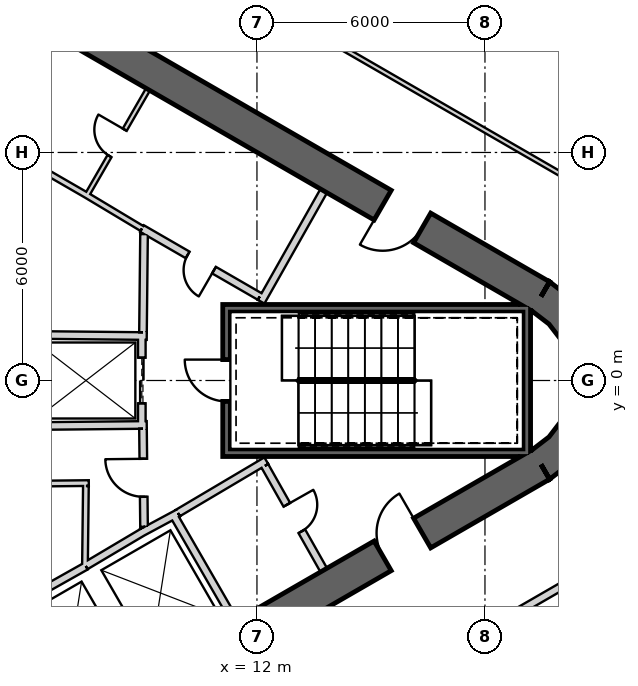
"""IFC4 building model, lengths in metres.
Left out: names, types, materials, properties, quantities, classifications, styles, units other than length and angle.
Written with IfcOpenShell. Run it as: python <this file> out.ifc"""

import sys

from ifc_helpers import new_model, si_unit, direction, frame, frame_2d, origin, place, context, subcontext, project, spatial, polyline, rectangle, outline, extrude, element, fill, save


model = new_model("IFC4")
c1 = context("Model", 3, precision=1e-05, world=origin(), true_north=direction((0.0, 1.0)))
c2 = subcontext(c1, "Body", "Model", "MODEL_VIEW")
j1 = project(units=[si_unit("LENGTHUNIT", "METRE"), si_unit("PLANEANGLEUNIT", "RADIAN")], contexts=[c1])
p1 = place(None, origin())
s1 = spatial("IfcSite", under=j1, at=p1, CompositionType="ELEMENT")
p2 = place(p1, origin())
s2 = spatial("IfcBuilding", under=s1, at=p2, CompositionType="ELEMENT")
p3 = place(p2, frame((0.0, 0.0, 404.8)))
s3 = spatial("IfcBuildingStorey", under=s2, at=p3, CompositionType="ELEMENT", Elevation=404.8)
p4 = place(p3, frame((19.475, 2.208, 0.0), z_axis=(0.0, 0.0, 1.0), x_axis=(-0.866028369851, 0.499994862586, 0.0)))
e1 = element("IfcWall", 1, at=p4, inside=s3, PredefinedType="SHEAR", context=c2, shape_type="SweptSolid", body=[
    extrude(rectangle(XDim=31.523, YDim=0.9, at=frame_2d((15.762, 0.0))), origin(), (0.0, 0.0, 1.0), 5.5),
])
p5 = place(p4, frame((3.612, 0.0, 0.0)))
e2 = element("IfcOpeningElement", 2, at=p5, cuts=e1, PredefinedType="OPENING", context=c2, shape_type="SweptSolid", body=[
    extrude(rectangle(XDim=1.2, YDim=2.4, at=frame_2d((0.6, 1.2))), frame((0.0, 0.46, 0.0), z_axis=(0.0, -1.0, 0.0), x_axis=(1.0, 0.0, 0.0)), (0.0, 0.0, 1.0), 0.92),
])
p6 = place(p4, frame((26.712, 0.0, 0.0)))
e3 = element("IfcOpeningElement", 3, at=p6, cuts=e1, PredefinedType="OPENING", context=c2, shape_type="SweptSolid", body=[
    extrude(rectangle(XDim=1.2, YDim=2.4, at=frame_2d((0.6, 1.2))), frame((0.0, 0.46, 0.0), z_axis=(0.0, -1.0, 0.0), x_axis=(1.0, 0.0, 0.0)), (0.0, 0.0, 1.0), 0.92),
])
p7 = place(p3, frame((-7.825, -17.97, 0.0), z_axis=(0.0, 0.0, 1.0), x_axis=(0.866028369851, 0.499994862586, 0.0)))
e4 = element("IfcWall", 4, at=p7, inside=s3, PredefinedType="SHEAR", context=c2, shape_type="SweptSolid", body=[
    extrude(rectangle(XDim=31.523, YDim=0.9, at=frame_2d((15.762, 0.0))), origin(), (0.0, 0.0, 1.0), 5.5),
])
p8 = place(p7, frame((7.062, 0.0, 0.0)))
e5 = element("IfcOpeningElement", 5, at=p8, cuts=e4, PredefinedType="OPENING", context=c2, shape_type="SweptSolid", body=[
    extrude(rectangle(XDim=1.2, YDim=2.4, at=frame_2d((0.6, 1.2))), frame((0.0, 0.46, 0.0), z_axis=(0.0, -1.0, 0.0), x_axis=(1.0, 0.0, 0.0)), (0.0, 0.0, 1.0), 0.92),
])
p9 = place(p7, frame((9.762, 0.0, 0.0)))
e6 = element("IfcOpeningElement", 6, at=p9, cuts=e4, PredefinedType="OPENING", context=c2, shape_type="SweptSolid", body=[
    extrude(rectangle(XDim=1.2, YDim=2.4, at=frame_2d((0.6, 1.2))), frame((0.0, 0.46, 0.0), z_axis=(0.0, -1.0, 0.0), x_axis=(1.0, 0.0, 0.0)), (0.0, 0.0, 1.0), 0.92),
])
p10 = place(p7, frame((17.862, 0.0, 0.0)))
e7 = element("IfcOpeningElement", 7, at=p10, cuts=e4, PredefinedType="OPENING", context=c2, shape_type="SweptSolid", body=[
    extrude(rectangle(XDim=1.2, YDim=2.4, at=frame_2d((0.6, 1.2))), frame((0.0, 0.46, 0.0), z_axis=(0.0, -1.0, 0.0), x_axis=(1.0, 0.0, 0.0)), (0.0, 0.0, 1.0), 0.92),
])
p11 = place(p7, frame((20.562, 0.0, 0.0)))
e8 = element("IfcOpeningElement", 8, at=p11, cuts=e4, PredefinedType="OPENING", context=c2, shape_type="SweptSolid", body=[
    extrude(rectangle(XDim=1.2, YDim=2.4, at=frame_2d((0.6, 1.2))), frame((0.0, 0.46, 0.0), z_axis=(0.0, -1.0, 0.0), x_axis=(1.0, 0.0, 0.0)), (0.0, 0.0, 1.0), 0.92),
])
p12 = place(p7, frame((26.712, 0.0, 0.0)))
e9 = element("IfcOpeningElement", 9, at=p12, cuts=e4, PredefinedType="OPENING", context=c2, shape_type="SweptSolid", body=[
    extrude(rectangle(XDim=1.2, YDim=2.4, at=frame_2d((0.6, 1.2))), frame((0.0, 0.46, 0.0), z_axis=(0.0, -1.0, 0.0), x_axis=(1.0, 0.0, 0.0)), (0.0, 0.0, 1.0), 0.92),
])
p13 = place(p7, frame((3.612, 0.0, 0.0)))
e10 = element("IfcOpeningElement", 10, at=p13, cuts=e4, PredefinedType="OPENING", context=c2, shape_type="SweptSolid", body=[
    extrude(rectangle(XDim=1.2, YDim=2.4, at=frame_2d((0.6, 1.2))), frame((0.0, 0.46, 0.0), z_axis=(0.0, -1.0, 0.0), x_axis=(1.0, 0.0, 0.0)), (0.0, 0.0, 1.0), 0.92),
])
p14 = place(p3, origin())
e11 = element("IfcWall", 11, at=p14, inside=s3, PredefinedType="SHEAR", context=c2, shape_type="SweptSolid", body=[
    extrude(outline(polyline([(19.7, -2.598), (20.321, -2.121), (20.798, -1.5), (21.098, -0.777), (21.2, 0.0), (21.098, 0.777), (20.798, 1.5), (20.321, 2.121), (19.7, 2.598), (19.25, 1.819), (19.685, 1.485), (20.019, 1.05), (20.229, 0.543), (20.3, 0.0), (20.229, -0.543), (20.019, -1.05), (19.685, -1.485), (19.25, -1.819), (19.7, -2.598)])), origin(), (0.0, 0.0, 1.0), 5.5),
])
p15 = place(p3, frame((5.231, -6.161, 0.0), z_axis=(0.0, 0.0, 1.0), x_axis=(0.871540428464, 0.4903236498, 0.0)))
e12 = element("IfcWall", 12, at=p15, inside=s3, PredefinedType="PLUMBINGWALL", context=c2, shape_type="SweptSolid", body=[
    extrude(rectangle(XDim=2.6, YDim=0.2, at=frame_2d((1.3, 0.0))), origin(), (0.0, 0.0, 1.0), 5.25),
])
p16 = place(p3, frame((9.795, -3.525, 0.0), z_axis=(0.0, 0.0, 1.0), x_axis=(0.499984717929, -0.866034226713, 0.0)))
e13 = element("IfcWall", 13, at=p16, inside=s3, PredefinedType="PLUMBINGWALL", context=c2, shape_type="SweptSolid", body=[
    extrude(rectangle(XDim=3.25, YDim=0.2, at=frame_2d((1.625, 0.0))), origin(), (0.0, 0.0, 1.0), 5.25),
])
p17 = place(p3, frame((8.974, -3.999, 0.0), z_axis=(0.0, 0.0, 1.0), x_axis=(0.880907015104, 0.473289373154, 0.0)))
e14 = element("IfcWall", 14, at=p17, inside=s3, PredefinedType="PLUMBINGWALL", context=c2, shape_type="SweptSolid", body=[
    extrude(rectangle(XDim=1.078, YDim=0.2, at=frame_2d((0.539, 0.0))), origin(), (0.0, 0.0, 1.0), 5.25),
])
p18 = place(p3, frame((7.493, -4.878, 0.0), z_axis=(0.0, 0.0, 1.0), x_axis=(0.859981807212, 0.510324691999, 0.0)))
e15 = element("IfcWall", 15, at=p18, inside=s3, PredefinedType="PLUMBINGWALL", context=c2, shape_type="SweptSolid", body=[
    extrude(rectangle(XDim=1.845, YDim=0.2, at=frame_2d((0.922, 0.0))), origin(), (0.0, 0.0, 1.0), 5.25),
])
p19 = place(p3, frame((19.2, 1.9, -0.3), z_axis=(0.0, 0.0, 1.0), x_axis=(-1.0, 0.0, 0.0)))
e16 = element("IfcWall", 16, at=p19, inside=s3, PredefinedType="SHEAR", context=c2, shape_type="SweptSolid", body=[
    extrude(rectangle(XDim=8.1, YDim=0.2, at=frame_2d((4.05, 0.0))), origin(), (0.0, 0.0, 1.0), 5.55),
])
p20 = place(p3, frame((19.1, -2.0, -0.3), z_axis=(0.0, 0.0, 1.0), x_axis=(0.0, 1.0, 0.0)))
e17 = element("IfcWall", 17, at=p20, inside=s3, PredefinedType="SHEAR", context=c2, shape_type="SweptSolid", body=[
    extrude(rectangle(XDim=3.8, YDim=0.2, at=frame_2d((1.9, 0.0))), origin(), (0.0, 0.0, 1.0), 5.55),
])
p21 = place(p3, frame((11.1, -1.9, -0.3), z_axis=(0.0, 0.0, 1.0), x_axis=(1.0, 0.0, 0.0)))
e18 = element("IfcWall", 18, at=p21, inside=s3, PredefinedType="SHEAR", context=c2, shape_type="SweptSolid", body=[
    extrude(rectangle(XDim=7.9, YDim=0.2, at=frame_2d((3.95, 0.0))), origin(), (0.0, 0.0, 1.0), 5.55),
])
p22 = place(p3, frame((11.2, -1.8, -0.3), z_axis=(0.0, 0.0, 1.0), x_axis=(0.0, 1.0, 0.0)))
e19 = element("IfcWall", 19, at=p22, inside=s3, PredefinedType="SHEAR", context=c2, shape_type="SweptSolid", body=[
    extrude(rectangle(XDim=3.6, YDim=0.2, at=frame_2d((1.8, 0.0))), origin(), (0.0, 0.0, 1.0), 5.55),
])
p23 = place(p22, frame((1.25, 0.0, 0.3)))
e20 = element("IfcOpeningElement", 20, at=p23, cuts=e19, PredefinedType="OPENING", context=c2, shape_type="SweptSolid", body=[
    extrude(rectangle(XDim=1.1, YDim=2.1, at=frame_2d((0.55, 1.05))), frame((0.0, 0.11, 0.0), z_axis=(0.0, -1.0, 0.0), x_axis=(1.0, 0.0, 0.0)), (0.0, 0.0, 1.0), 0.22),
])
p24 = place(p3, frame((8.97, 1.2, 0.0), z_axis=(0.0, 0.0, 1.0), x_axis=(0.0, -1.0, 0.0)))
e21 = element("IfcWall", 21, at=p24, inside=s3, PredefinedType="PLUMBINGWALL", context=c2, shape_type="SweptSolid", body=[
    extrude(rectangle(XDim=2.4, YDim=0.2, at=frame_2d((1.2, 0.0))), origin(), (0.0, 0.0, 1.0), 5.25),
])
p25 = place(p24, frame((0.6, 0.0, 0.0)))
e22 = element("IfcOpeningElement", 22, at=p25, cuts=e21, PredefinedType="OPENING", context=c2, shape_type="SweptSolid", body=[
    extrude(rectangle(XDim=1.2, YDim=2.4, at=frame_2d((0.6, 1.2))), frame((0.0, 0.11, 0.0), z_axis=(0.0, -1.0, 0.0), x_axis=(1.0, 0.0, 0.0)), (0.0, 0.0, 1.0), 0.22),
])
for number, where, z_axis, x_axis in (
    (23, (5.9, 1.201, 0.0), (0.0, 0.0, 1.0), (1.0, -0.01, 0.0)),
    (24, (5.9, -1.201, 0.0), (0.0, 0.0, 1.0), (1.0, 0.01, 0.0)),
):
    element("IfcWall", number, at=place(p3, frame(where, z_axis=z_axis, x_axis=x_axis)), inside=s3, PredefinedType="PLUMBINGWALL", context=c2, shape_type="SweptSolid", body=[
        extrude(rectangle(XDim=3.2, YDim=0.2, at=frame_2d((1.6, 0.0))), origin(), (0.0, 0.0, 1.0), 5.25),
    ])
p26 = place(p3, frame((7.508, 4.845, 0.0), z_axis=(0.0, 0.0, 1.0), x_axis=(0.500017246033, 0.866015446554, 0.0)))
e25 = element("IfcWall", 25, at=p26, inside=s3, PredefinedType="PARTITIONING", context=c2, shape_type="SweptSolid", body=[
    extrude(rectangle(XDim=3.25, YDim=0.12, at=frame_2d((1.625, 0.0))), origin(), (0.0, 0.0, 1.0), 5.25),
])
p27 = place(p26, frame((1.225, 0.0, 0.0)))
e26 = element("IfcOpeningElement", 26, at=p27, cuts=e25, PredefinedType="OPENING", context=c2, shape_type="SweptSolid", body=[
    extrude(rectangle(XDim=0.8, YDim=2.1, at=frame_2d((0.4, 1.05))), frame((0.0, 0.07, 0.0), z_axis=(0.0, -1.0, 0.0), x_axis=(1.0, 0.0, 0.0)), (0.0, 0.0, 1.0), 0.14),
])
p28 = place(p3, frame((12.11, 2.073, 0.0), z_axis=(0.0, 0.0, 1.0), x_axis=(0.49196600604, 0.870614408852, 0.0)))
e27 = element("IfcWall", 27, at=p28, inside=s3, PredefinedType="PARTITIONING", context=c2, shape_type="SweptSolid", body=[
    extrude(rectangle(XDim=3.35, YDim=0.2, at=frame_2d((1.675, 0.0))), origin(), (0.0, 0.0, 1.0), 5.25),
])
p29 = place(p3, frame((8.974, 3.999, 0.0), z_axis=(0.0, 0.0, 1.0), x_axis=(0.86601284211, -0.500021756827, 0.0)))
e28 = element("IfcWall", 28, at=p29, inside=s3, PredefinedType="PARTITIONING", context=c2, shape_type="SweptSolid", body=[
    extrude(rectangle(XDim=3.577, YDim=0.2, at=frame_2d((1.789, 0.0))), origin(), (0.0, 0.0, 1.0), 5.25),
])
p30 = place(p29, frame((1.389, 0.0, 0.0)))
e29 = element("IfcOpeningElement", 29, at=p30, cuts=e28, PredefinedType="OPENING", context=c2, shape_type="SweptSolid", body=[
    extrude(rectangle(XDim=0.8, YDim=2.1, at=frame_2d((0.4, 1.05))), frame((0.0, 0.11, 0.0), z_axis=(0.0, -1.0, 0.0), x_axis=(1.0, 0.0, 0.0)), (0.0, 0.0, 1.0), 0.22),
])
p31 = place(p3, frame((8.975, 4.0, 0.0), z_axis=(0.0, 0.0, 1.0), x_axis=(-0.857530436795, 0.514433231791, 0.0)))
e30 = element("IfcWall", 30, at=p31, inside=s3, PredefinedType="PLUMBINGWALL", context=c2, shape_type="SweptSolid", body=[
    extrude(rectangle(XDim=1.723, YDim=0.15, at=frame_2d((0.861, 0.0))), origin(), (0.0, 0.0, 1.0), 5.25),
])
p32 = place(p3, frame((7.497, 4.886, 0.0), z_axis=(0.0, 0.0, 1.0), x_axis=(-0.866030989016, 0.499990325971, 0.0)))
e31 = element("IfcWall", 31, at=p32, inside=s3, PredefinedType="PLUMBINGWALL", context=c2, shape_type="SweptSolid", body=[
    extrude(rectangle(XDim=8.1, YDim=0.15, at=frame_2d((4.05, 0.0))), origin(), (0.0, 0.0, 1.0), 5.25),
])
p33 = place(p32, frame((3.65, 0.0, 0.0)))
e32 = element("IfcOpeningElement", 32, at=p33, cuts=e31, PredefinedType="OPENING", context=c2, shape_type="SweptSolid", body=[
    extrude(rectangle(XDim=0.8, YDim=2.1, at=frame_2d((0.4, 1.05))), frame((0.0, 0.085, 0.0), z_axis=(0.0, -1.0, 0.0), x_axis=(1.0, 0.0, 0.0)), (0.0, 0.0, 1.0), 0.17),
])
p34 = place(p3, frame((12.245, -2.109, 0.0), z_axis=(0.0, 0.0, 1.0), x_axis=(-0.860414880418, -0.509594185166, 0.0)))
e33 = element("IfcWall", 33, at=p34, inside=s3, PredefinedType="PARTITIONING", context=c2, shape_type="SweptSolid", body=[
    extrude(rectangle(XDim=2.7, YDim=0.2, at=frame_2d((1.35, 0.0))), origin(), (0.0, 0.0, 1.0), 5.25),
])
p35 = place(p3, frame((13.758, -4.99, 0.0), z_axis=(0.0, 0.0, 1.0), x_axis=(-0.491993409184, 0.87059892334, 0.0)))
e34 = element("IfcWall", 34, at=p35, inside=s3, PredefinedType="PARTITIONING", context=c2, shape_type="SweptSolid", body=[
    extrude(rectangle(XDim=3.15, YDim=0.2, at=frame_2d((1.575, 0.0))), origin(), (0.0, 0.0, 1.0), 5.25),
])
p36 = place(p35, frame((1.175, 0.0, 0.0)))
e35 = element("IfcOpeningElement", 35, at=p36, cuts=e34, PredefinedType="OPENING", context=c2, shape_type="SweptSolid", body=[
    extrude(rectangle(XDim=0.8, YDim=2.1, at=frame_2d((0.4, 1.05))), frame((0.0, 0.11, 0.0), z_axis=(0.0, -1.0, 0.0), x_axis=(1.0, 0.0, 0.0)), (0.0, 0.0, 1.0), 0.22),
])
p37 = place(p3, frame((9.001, 1.27, 0.0), z_axis=(0.0, 0.0, 1.0), x_axis=(0.010780534828, 0.999941888346, 0.0)))
e36 = element("IfcWall", 36, at=p37, inside=s3, PredefinedType="PARTITIONING", context=c2, shape_type="SweptSolid", body=[
    extrude(rectangle(XDim=2.582, YDim=0.2, at=frame_2d((1.291, 0.0))), origin(), (0.0, 0.0, 1.0), 5.25),
])
p38 = place(p3, frame((9.029, -3.851, 0.0), z_axis=(0.0, 0.0, 1.0), x_axis=(-0.010783593937, 0.99994185536, 0.0)))
e37 = element("IfcWall", 37, at=p38, inside=s3, PredefinedType="PARTITIONING", context=c2, shape_type="SweptSolid", body=[
    extrude(rectangle(XDim=2.581, YDim=0.2, at=frame_2d((1.291, 0.0))), origin(), (0.0, 0.0, 1.0), 5.25),
])
p39 = place(p38, frame((0.791, 0.0, 0.0)))
e38 = element("IfcOpeningElement", 38, at=p39, cuts=e37, PredefinedType="OPENING", context=c2, shape_type="SweptSolid", body=[
    extrude(rectangle(XDim=1.0, YDim=2.1, at=frame_2d((0.5, 1.05))), frame((0.0, 0.11, 0.0), z_axis=(0.0, -1.0, 0.0), x_axis=(1.0, 0.0, 0.0)), (0.0, 0.0, 1.0), 0.22),
])
p40 = place(p3, frame((7.575, -2.699, 0.0), z_axis=(0.0, 0.0, 1.0), x_axis=(-0.999947791603, -0.010218320275, 0.0)))
e39 = element("IfcWall", 39, at=p40, inside=s3, PredefinedType="PLUMBINGWALL", context=c2, shape_type="SweptSolid", body=[
    extrude(rectangle(XDim=2.867, YDim=0.15, at=frame_2d((1.434, 0.0))), origin(), (0.0, 0.0, 1.0), 5.25),
])
p41 = place(p40, frame((1.071, 0.0, 0.0)))
e40 = element("IfcOpeningElement", 40, at=p41, cuts=e39, PredefinedType="OPENING", context=c2, shape_type="SweptSolid", body=[
    extrude(rectangle(XDim=0.8, YDim=2.1, at=frame_2d((0.4, 1.05))), frame((0.0, 0.085, 0.0), z_axis=(0.0, -1.0, 0.0), x_axis=(1.0, 0.0, 0.0)), (0.0, 0.0, 1.0), 0.17),
])
p42 = place(p3, frame((7.475, -4.865, 0.0), z_axis=(0.0, 0.0, 1.0), x_axis=(0.011682810534, 0.99993175364, 0.0)))
e41 = element("IfcWall", 41, at=p42, inside=s3, PredefinedType="PLUMBINGWALL", context=c2, shape_type="SweptSolid", body=[
    extrude(rectangle(XDim=2.09, YDim=0.15, at=frame_2d((1.045, 0.0))), origin(), (0.0, 0.0, 1.0), 5.25),
])
p43 = place(p3, frame((21.518, 4.551, 0.0), z_axis=(0.0, 0.0, 1.0), x_axis=(-0.866022813823, 0.500004485919, 0.0)))
e42 = element("IfcWall", 42, at=p43, inside=s3, PredefinedType="PARTITIONING", context=c2, shape_type="SweptSolid", body=[
    extrude(rectangle(XDim=22.655, YDim=0.12, at=frame_2d((11.327, 0.0))), origin(), (0.0, 0.0, 1.0), 5.25),
])
p44 = place(p43, frame((10.86, 0.0, 0.0)))
e43 = element("IfcOpeningElement", 43, at=p44, cuts=e42, PredefinedType="OPENING", context=c2, shape_type="SweptSolid", body=[
    extrude(rectangle(XDim=1.0, YDim=2.1, at=frame_2d((0.5, 1.05))), frame((0.0, 0.07, 0.0), z_axis=(0.0, -1.0, 0.0), x_axis=(1.0, 0.0, 0.0)), (0.0, 0.0, 1.0), 0.14),
])
p45 = place(p3, frame((12.802, -9.583, 0.0), z_axis=(0.0, 0.0, 1.0), x_axis=(0.866025905529, 0.499999130952, 0.0)))
e44 = element("IfcWall", 44, at=p45, inside=s3, PredefinedType="PARTITIONING", context=c2, shape_type="SweptSolid", body=[
    extrude(rectangle(XDim=9.904, YDim=0.2, at=frame_2d((4.952, 0.0))), origin(), (0.0, 0.0, 1.0), 5.25),
])
p46 = place(p45, frame((4.456, 0.0, 0.0)))
e45 = element("IfcOpeningElement", 45, at=p46, cuts=e44, PredefinedType="OPENING", context=c2, shape_type="SweptSolid", body=[
    extrude(rectangle(XDim=1.0, YDim=2.1, at=frame_2d((0.5, 1.05))), frame((0.0, 0.11, 0.0), z_axis=(0.0, -1.0, 0.0), x_axis=(1.0, 0.0, 0.0)), (0.0, 0.0, 1.0), 0.22),
])
p47 = place(p23, origin())
e46 = element("IfcDoor", 46, at=p47, inside=s3, OperationType="SINGLE_SWING_RIGHT", PredefinedType="USERDEFINED", context=c2, shape_type="SweptSolid", body=[
    extrude(rectangle(XDim=1.1, YDim=2.1, at=frame_2d((0.55, 1.05))), frame((0.0, 0.025, 0.0), z_axis=(0.0, -1.0, 0.0), x_axis=(1.0, 0.0, 0.0)), (0.0, 0.0, 1.0), 0.05),
])
fill(e20, e46)
p48 = place(p39, origin())
e47 = element("IfcDoor", 47, at=p48, inside=s3, OperationType="SINGLE_SWING_RIGHT", PredefinedType="USERDEFINED", context=c2, shape_type="SweptSolid", body=[
    extrude(rectangle(XDim=1.0, YDim=2.1, at=frame_2d((0.5, 1.05))), frame((0.0, 0.025, 0.0), z_axis=(0.0, -1.0, 0.0), x_axis=(1.0, 0.0, 0.0)), (0.0, 0.0, 1.0), 0.05),
])
fill(e38, e47)
p49 = place(p25, origin())
e48 = element("IfcDoor", 48, at=p49, inside=s3, OperationType="SLIDING_TO_LEFT", PredefinedType="USERDEFINED", context=c2, shape_type="SweptSolid", body=[
    extrude(rectangle(XDim=1.2, YDim=2.4, at=frame_2d((0.6, 1.2))), frame((0.0, 0.025, 0.0), z_axis=(0.0, -1.0, 0.0), x_axis=(1.0, 0.0, 0.0)), (0.0, 0.0, 1.0), 0.05),
])
fill(e22, e48)
p50 = place(p30, origin())
e49 = element("IfcDoor", 49, at=p50, inside=s3, OperationType="SINGLE_SWING_RIGHT", PredefinedType="USERDEFINED", context=c2, shape_type="SweptSolid", body=[
    extrude(rectangle(XDim=0.8, YDim=2.1, at=frame_2d((0.4, 1.05))), frame((0.0, 0.025, 0.0), z_axis=(0.0, -1.0, 0.0), x_axis=(1.0, 0.0, 0.0)), (0.0, 0.0, 1.0), 0.05),
])
fill(e29, e49)
p51 = place(p36, origin())
e50 = element("IfcDoor", 50, at=p51, inside=s3, OperationType="SINGLE_SWING_RIGHT", PredefinedType="USERDEFINED", context=c2, shape_type="SweptSolid", body=[
    extrude(rectangle(XDim=0.8, YDim=2.1, at=frame_2d((0.4, 1.05))), frame((0.0, 0.025, 0.0), z_axis=(0.0, -1.0, 0.0), x_axis=(1.0, 0.0, 0.0)), (0.0, 0.0, 1.0), 0.05),
])
fill(e35, e50)
p52 = place(p27, origin())
e51 = element("IfcDoor", 51, at=p52, inside=s3, OperationType="SINGLE_SWING_RIGHT", PredefinedType="USERDEFINED", context=c2, shape_type="SweptSolid", body=[
    extrude(rectangle(XDim=0.8, YDim=2.1, at=frame_2d((0.4, 1.05))), frame((0.0, 0.025, 0.0), z_axis=(0.0, -1.0, 0.0), x_axis=(1.0, 0.0, 0.0)), (0.0, 0.0, 1.0), 0.05),
])
fill(e26, e51)
p53 = place(p12, origin())
e52 = element("IfcDoor", 52, at=p53, inside=s3, OperationType="SINGLE_SWING_RIGHT", PredefinedType="USERDEFINED", context=c2, shape_type="SweptSolid", body=[
    extrude(rectangle(XDim=1.2, YDim=2.4, at=frame_2d((0.6, 1.2))), frame((0.0, 0.025, 0.0), z_axis=(0.0, -1.0, 0.0), x_axis=(1.0, 0.0, 0.0)), (0.0, 0.0, 1.0), 0.05),
])
fill(e9, e52)
p54 = place(p5, origin())
e53 = element("IfcDoor", 53, at=p54, inside=s3, OperationType="SINGLE_SWING_RIGHT", PredefinedType="USERDEFINED", context=c2, shape_type="SweptSolid", body=[
    extrude(rectangle(XDim=1.2, YDim=2.4, at=frame_2d((0.6, 1.2))), frame((0.0, 0.025, 0.0), z_axis=(0.0, -1.0, 0.0), x_axis=(1.0, 0.0, 0.0)), (0.0, 0.0, 1.0), 0.05),
])
fill(e2, e53)
save(model, sys.argv[1])
